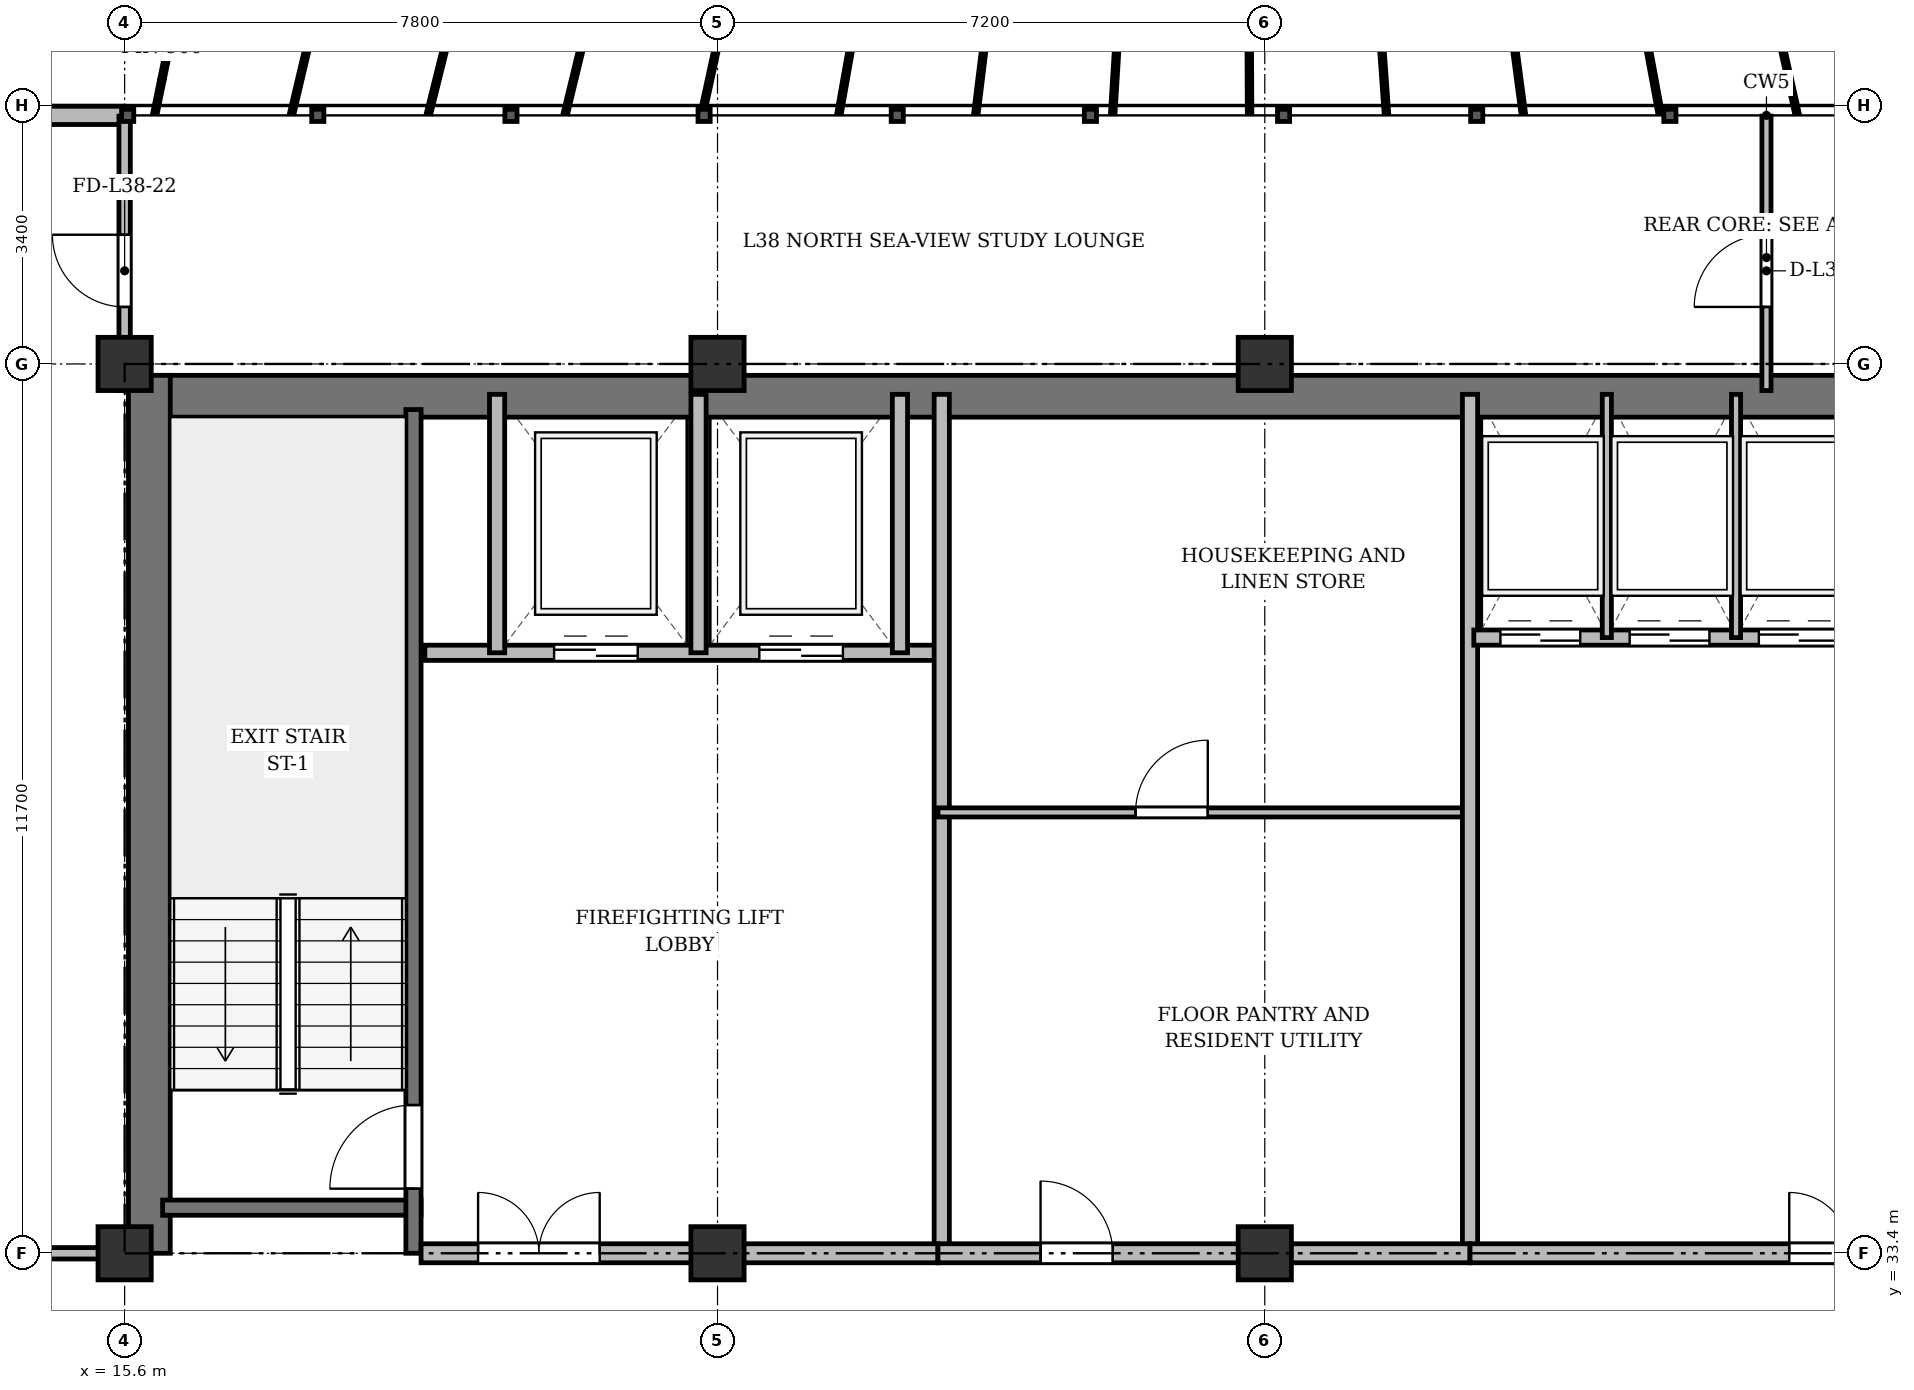
"""IFC4 building model, lengths in metres.
Left out: names, types, materials, properties, quantities, classifications, styles, units other than length and angle.
Written with IfcOpenShell. Run it as: python <this file> out.ifc"""

import sys

from ifc_helpers import new_model, si_unit, direction, frame, frame_2d, origin, origin_2d, place, context, subcontext, project, spatial, rectangle, extrude, source, transform, mapped, element, fill, save


model = new_model("IFC4")
c1 = context("Model", 3, precision=1e-05, world=origin(), true_north=direction((0.0, 1.0)))
c2 = subcontext(c1, "Body", "Model", "MODEL_VIEW")
j1 = project(units=[si_unit("LENGTHUNIT", "METRE"), si_unit("PLANEANGLEUNIT", "RADIAN")], contexts=[c1])
p1 = place(None, origin())
s1 = spatial("IfcSite", under=j1, at=p1, CompositionType="ELEMENT")
p2 = place(p1, origin())
s2 = spatial("IfcBuilding", under=s1, at=p2, CompositionType="ELEMENT")
p3 = place(p2, frame((0.0, 0.0, 146.5)))
s3 = spatial("IfcBuildingStorey", under=s2, at=p3, CompositionType="ELEMENT", Elevation=146.5)
m1 = source(origin(), c2, "Body", "SweptSolid", [
    extrude(rectangle(XDim=0.7, YDim=0.7, at=origin_2d()), origin(), (0.0, 0.0, 1.0), 3.6),
])
for number, where, z_axis, x_axis in (
    (1, (15.6, 33.4, 0.0), (0.0, 0.0, 1.0), (1.0, 0.0, 0.0)),
    (2, (15.6, 45.1, 0.0), (0.0, 0.0, 1.0), (1.0, 0.0, 0.0)),
    (3, (23.4, 33.4, 0.0), (0.0, 0.0, 1.0), (1.0, 0.0, 0.0)),
    (4, (23.4, 45.1, 0.0), (0.0, 0.0, 1.0), (1.0, 0.0, 0.0)),
    (5, (30.6, 33.4, 0.0), (0.0, 0.0, 1.0), (1.0, 0.0, 0.0)),
    (6, (30.6, 45.1, 0.0), (0.0, 0.0, 1.0), (1.0, 0.0, 0.0)),
):
    element("IfcColumn", number, at=place(p3, frame(where, z_axis=z_axis, x_axis=x_axis)), inside=s3, PredefinedType="COLUMN", context=c2, shape_type="MappedRepresentation", body=[
        mapped(m1, transform((0.0, 0.0, 0.0), x_axis=(1.0, 0.0, 0.0), y_axis=(0.0, 1.0, 0.0), z_axis=(0.0, 0.0, 1.0), scale=1.0)),
    ])
p4 = place(p3, frame((10.9, 48.37, 0.0), z_axis=(0.0, 0.0, 1.0), x_axis=(1.0, 0.0, 0.0)))
e7 = element("IfcWall", 7, at=p4, inside=s3, PredefinedType="SOLIDWALL", context=c2, shape_type="SweptSolid", body=[
    extrude(rectangle(XDim=4.7, YDim=0.24, at=frame_2d((2.35, 0.0))), origin(), (0.0, 0.0, 1.0), 3.35),
])
p5 = place(p4, frame((1.659, 0.0, 0.9)))
e8 = element("IfcOpeningElement", 8, at=p5, cuts=e7, PredefinedType="OPENING", context=c2, shape_type="SweptSolid", body=[
    extrude(rectangle(XDim=1.2, YDim=1.65, at=frame_2d((0.6, 0.825))), frame((0.0, 0.13, 0.0), z_axis=(0.0, -1.0, 0.0), x_axis=(1.0, 0.0, 0.0)), (0.0, 0.0, 1.0), 0.26),
])
p6 = place(p3, frame((15.65, 44.675, 0.0), z_axis=(0.0, 0.0, 1.0), x_axis=(1.0, 0.0, 0.0)))
e9 = element("IfcWall", 9, at=p6, inside=s3, PredefinedType="SHEAR", context=c2, shape_type="SweptSolid", body=[
    extrude(rectangle(XDim=43.1, YDim=0.55, at=frame_2d((21.55, 0.0))), origin(), (0.0, 0.0, 1.0), 3.35),
])
p7 = place(p3, frame((15.925, 33.4, 0.0), z_axis=(0.0, 0.0, 1.0), x_axis=(0.0, 1.0, 0.0)))
e10 = element("IfcWall", 10, at=p7, inside=s3, PredefinedType="SHEAR", context=c2, shape_type="SweptSolid", body=[
    extrude(rectangle(XDim=11.55, YDim=0.55, at=frame_2d((5.775, 0.0))), origin(), (0.0, 0.0, 1.0), 3.35),
])
p8 = place(p3, frame((16.1, 34.0, 0.0), z_axis=(0.0, 0.0, 1.0), x_axis=(1.0, 0.0, 0.0)))
e11 = element("IfcWall", 11, at=p8, inside=s3, PredefinedType="SHEAR", context=c2, shape_type="SweptSolid", body=[
    extrude(rectangle(XDim=3.4, YDim=0.2, at=frame_2d((1.7, 0.0))), origin(), (0.0, 0.0, 1.0), 3.35),
])
p9 = place(p3, frame((19.4, 33.4, 0.0), z_axis=(0.0, 0.0, 1.0), x_axis=(0.0, 1.0, 0.0)))
e12 = element("IfcWall", 12, at=p9, inside=s3, PredefinedType="SHEAR", context=c2, shape_type="SweptSolid", body=[
    extrude(rectangle(XDim=11.1, YDim=0.2, at=frame_2d((5.55, 0.0))), origin(), (0.0, 0.0, 1.0), 3.35),
])
p10 = place(p9, frame((0.85, 0.0, 0.0)))
e13 = element("IfcOpeningElement", 13, at=p10, cuts=e12, PredefinedType="OPENING", context=c2, shape_type="SweptSolid", body=[
    extrude(rectangle(XDim=1.1, YDim=2.15, at=frame_2d((0.55, 1.075))), frame((0.0, 0.11, 0.0), z_axis=(0.0, -1.0, 0.0), x_axis=(1.0, 0.0, 0.0)), (0.0, 0.0, 1.0), 0.22),
])
p11 = place(p3, frame((19.55, 41.3, 0.0), z_axis=(0.0, 0.0, 1.0), x_axis=(1.0, 0.0, 0.0)))
e14 = element("IfcWall", 14, at=p11, inside=s3, PredefinedType="SOLIDWALL", context=c2, shape_type="SweptSolid", body=[
    extrude(rectangle(XDim=6.75, YDim=0.2, at=frame_2d((3.375, 0.0))), origin(), (0.0, 0.0, 1.0), 3.35),
])
p12 = place(p11, frame((1.7, 0.0, 0.0)))
e15 = element("IfcOpeningElement", 15, at=p12, cuts=e14, PredefinedType="OPENING", context=c2, shape_type="SweptSolid", body=[
    extrude(rectangle(XDim=1.1, YDim=2.15, at=frame_2d((0.55, 1.075))), frame((0.0, 0.11, 0.0), z_axis=(0.0, -1.0, 0.0), x_axis=(1.0, 0.0, 0.0)), (0.0, 0.0, 1.0), 0.22),
])
p13 = place(p11, frame((4.4, 0.0, 0.0)))
e16 = element("IfcOpeningElement", 16, at=p13, cuts=e14, PredefinedType="OPENING", context=c2, shape_type="SweptSolid", body=[
    extrude(rectangle(XDim=1.1, YDim=2.15, at=frame_2d((0.55, 1.075))), frame((0.0, 0.11, 0.0), z_axis=(0.0, -1.0, 0.0), x_axis=(1.0, 0.0, 0.0)), (0.0, 0.0, 1.0), 0.22),
])
for number, where, z_axis, x_axis in (
    (17, (20.5, 41.3, 0.0), (0.0, 0.0, 1.0), (0.0, 1.0, 0.0)),
    (18, (23.15, 41.3, 0.0), (0.0, 0.0, 1.0), (0.0, 1.0, 0.0)),
    (19, (25.8, 41.3, 0.0), (0.0, 0.0, 1.0), (0.0, 1.0, 0.0)),
):
    element("IfcWall", number, at=place(p3, frame(where, z_axis=z_axis, x_axis=x_axis)), inside=s3, PredefinedType="SOLIDWALL", context=c2, shape_type="SweptSolid", body=[
        extrude(rectangle(XDim=3.4, YDim=0.2, at=frame_2d((1.7, 0.0))), origin(), (0.0, 0.0, 1.0), 3.35),
    ])
p14 = place(p3, frame((26.35, 33.4, 0.0), z_axis=(0.0, 0.0, 1.0), x_axis=(0.0, 1.0, 0.0)))
e20 = element("IfcWall", 20, at=p14, inside=s3, PredefinedType="SOLIDWALL", context=c2, shape_type="SweptSolid", body=[
    extrude(rectangle(XDim=11.3, YDim=0.2, at=frame_2d((5.65, 0.0))), origin(), (0.0, 0.0, 1.0), 2.75),
])
p15 = place(p3, frame((19.5, 33.4, 0.0), z_axis=(0.0, 0.0, 1.0), x_axis=(1.0, 0.0, 0.0)))
e21 = element("IfcWall", 21, at=p15, inside=s3, PredefinedType="PARTITIONING", context=c2, shape_type="SweptSolid", body=[
    extrude(rectangle(XDim=6.8, YDim=0.25, at=frame_2d((3.4, 0.0))), origin(), (0.0, 0.0, 1.0), 2.75),
])
p16 = place(p15, frame((0.75, 0.0, 0.0)))
e22 = element("IfcOpeningElement", 22, at=p16, cuts=e21, PredefinedType="OPENING", context=c2, shape_type="SweptSolid", body=[
    extrude(rectangle(XDim=1.6, YDim=2.2, at=frame_2d((0.8, 1.1))), frame((0.0, 0.135, 0.0), z_axis=(0.0, -1.0, 0.0), x_axis=(1.0, 0.0, 0.0)), (0.0, 0.0, 1.0), 0.27),
])
p17 = place(p3, frame((26.3, 39.2, 0.0), z_axis=(0.0, 0.0, 1.0), x_axis=(1.0, 0.0, 0.0)))
e23 = element("IfcWall", 23, at=p17, inside=s3, PredefinedType="PARTITIONING", context=c2, shape_type="SweptSolid", body=[
    extrude(rectangle(XDim=7.0, YDim=0.12, at=frame_2d((3.5, 0.0))), origin(), (0.0, 0.0, 1.0), 2.85),
])
p18 = place(p17, frame((2.6, 0.0, 0.0)))
e24 = element("IfcOpeningElement", 24, at=p18, cuts=e23, PredefinedType="OPENING", context=c2, shape_type="SweptSolid", body=[
    extrude(rectangle(XDim=0.95, YDim=2.15, at=frame_2d((0.475, 1.075))), frame((0.0, 0.07, 0.0), z_axis=(0.0, -1.0, 0.0), x_axis=(1.0, 0.0, 0.0)), (0.0, 0.0, 1.0), 0.14),
])
p19 = place(p3, frame((33.3, 33.4, 0.0), z_axis=(0.0, 0.0, 1.0), x_axis=(0.0, 1.0, 0.0)))
e25 = element("IfcWall", 25, at=p19, inside=s3, PredefinedType="SOLIDWALL", context=c2, shape_type="SweptSolid", body=[
    extrude(rectangle(XDim=11.3, YDim=0.2, at=frame_2d((5.65, 0.0))), origin(), (0.0, 0.0, 1.0), 2.75),
])
p20 = place(p3, frame((33.35, 41.5, 0.0), z_axis=(0.0, 0.0, 1.0), x_axis=(1.0, 0.0, 0.0)))
e26 = element("IfcWall", 26, at=p20, inside=s3, PredefinedType="SOLIDWALL", context=c2, shape_type="SweptSolid", body=[
    extrude(rectangle(XDim=6.9, YDim=0.2, at=frame_2d((3.45, 0.0))), origin(), (0.0, 0.0, 1.0), 3.35),
])
p21 = place(p20, frame((0.35, 0.0, 0.0)))
e27 = element("IfcOpeningElement", 27, at=p21, cuts=e26, PredefinedType="OPENING", context=c2, shape_type="SweptSolid", body=[
    extrude(rectangle(XDim=1.05, YDim=2.15, at=frame_2d((0.525, 1.075))), frame((0.0, 0.11, 0.0), z_axis=(0.0, -1.0, 0.0), x_axis=(1.0, 0.0, 0.0)), (0.0, 0.0, 1.0), 0.22),
])
p22 = place(p20, frame((2.05, 0.0, 0.0)))
e28 = element("IfcOpeningElement", 28, at=p22, cuts=e26, PredefinedType="OPENING", context=c2, shape_type="SweptSolid", body=[
    extrude(rectangle(XDim=1.05, YDim=2.15, at=frame_2d((0.525, 1.075))), frame((0.0, 0.11, 0.0), z_axis=(0.0, -1.0, 0.0), x_axis=(1.0, 0.0, 0.0)), (0.0, 0.0, 1.0), 0.22),
])
p23 = place(p20, frame((3.75, 0.0, 0.0)))
e29 = element("IfcOpeningElement", 29, at=p23, cuts=e26, PredefinedType="OPENING", context=c2, shape_type="SweptSolid", body=[
    extrude(rectangle(XDim=1.05, YDim=2.15, at=frame_2d((0.525, 1.075))), frame((0.0, 0.11, 0.0), z_axis=(0.0, -1.0, 0.0), x_axis=(1.0, 0.0, 0.0)), (0.0, 0.0, 1.0), 0.22),
])
p24 = place(p20, frame((5.45, 0.0, 0.0)))
e30 = element("IfcOpeningElement", 30, at=p24, cuts=e26, PredefinedType="OPENING", context=c2, shape_type="SweptSolid", body=[
    extrude(rectangle(XDim=1.05, YDim=2.15, at=frame_2d((0.525, 1.075))), frame((0.0, 0.11, 0.0), z_axis=(0.0, -1.0, 0.0), x_axis=(1.0, 0.0, 0.0)), (0.0, 0.0, 1.0), 0.22),
])
for number, where, z_axis, x_axis in (
    (31, (35.1, 41.5, 0.0), (0.0, 0.0, 1.0), (0.0, 1.0, 0.0)),
    (32, (36.8, 41.5, 0.0), (0.0, 0.0, 1.0), (0.0, 1.0, 0.0)),
):
    element("IfcWall", number, at=place(p3, frame(where, z_axis=z_axis, x_axis=x_axis)), inside=s3, PredefinedType="PARTITIONING", context=c2, shape_type="SweptSolid", body=[
        extrude(rectangle(XDim=3.2, YDim=0.12, at=frame_2d((1.6, 0.0))), origin(), (0.0, 0.0, 1.0), 3.35),
    ])
p25 = place(p3, frame((26.3, 33.4, 0.0), z_axis=(0.0, 0.0, 1.0), x_axis=(1.0, 0.0, 0.0)))
e33 = element("IfcWall", 33, at=p25, inside=s3, PredefinedType="PARTITIONING", context=c2, shape_type="SweptSolid", body=[
    extrude(rectangle(XDim=7.0, YDim=0.25, at=frame_2d((3.5, 0.0))), origin(), (0.0, 0.0, 1.0), 2.75),
])
p26 = place(p25, frame((1.35, 0.0, 0.0)))
e34 = element("IfcOpeningElement", 34, at=p26, cuts=e33, PredefinedType="OPENING", context=c2, shape_type="SweptSolid", body=[
    extrude(rectangle(XDim=0.95, YDim=2.15, at=frame_2d((0.475, 1.075))), frame((0.0, 0.135, 0.0), z_axis=(0.0, -1.0, 0.0), x_axis=(1.0, 0.0, 0.0)), (0.0, 0.0, 1.0), 0.27),
])
p27 = place(p3, frame((33.3, 33.4, 0.0), z_axis=(0.0, 0.0, 1.0), x_axis=(1.0, 0.0, 0.0)))
e35 = element("IfcWall", 35, at=p27, inside=s3, PredefinedType="PARTITIONING", context=c2, shape_type="SweptSolid", body=[
    extrude(rectangle(XDim=13.85, YDim=0.25, at=frame_2d((6.925, 0.0))), origin(), (0.0, 0.0, 1.0), 2.75),
])
p28 = place(p27, frame((4.2, 0.0, 0.0)))
e36 = element("IfcOpeningElement", 36, at=p28, cuts=e35, PredefinedType="OPENING", context=c2, shape_type="SweptSolid", body=[
    extrude(rectangle(XDim=1.6, YDim=2.2, at=frame_2d((0.8, 1.1))), frame((0.0, 0.135, 0.0), z_axis=(0.0, -1.0, 0.0), x_axis=(1.0, 0.0, 0.0)), (0.0, 0.0, 1.0), 0.27),
])
p29 = place(p3, frame((8.05, 33.4, 0.0), z_axis=(0.0, 0.0, 1.0), x_axis=(1.0, 0.0, 0.0)))
e37 = element("IfcWall", 37, at=p29, inside=s3, PredefinedType="PARTITIONING", context=c2, shape_type="SweptSolid", body=[
    extrude(rectangle(XDim=7.55, YDim=0.15, at=frame_2d((3.775, 0.0))), origin(), (0.0, 0.0, 1.0), 2.75),
])
p30 = place(p29, frame((3.2, 0.0, 0.0)))
e38 = element("IfcOpeningElement", 38, at=p30, cuts=e37, PredefinedType="OPENING", context=c2, shape_type="SweptSolid", body=[
    extrude(rectangle(XDim=0.95, YDim=2.15, at=frame_2d((0.475, 1.075))), frame((0.0, 0.085, 0.0), z_axis=(0.0, -1.0, 0.0), x_axis=(1.0, 0.0, 0.0)), (0.0, 0.0, 1.0), 0.17),
])
p31 = place(p3, frame((37.2, 44.75, 0.0), z_axis=(0.0, 0.0, 1.0), x_axis=(0.0, 1.0, 0.0)))
e39 = element("IfcWall", 39, at=p31, inside=s3, PredefinedType="PARTITIONING", context=c2, shape_type="SweptSolid", body=[
    extrude(rectangle(XDim=3.61, YDim=0.12, at=frame_2d((1.805, 0.0))), origin(), (0.0, 0.0, 1.0), 2.75),
])
p32 = place(p31, frame((1.1, 0.0, 0.0)))
e40 = element("IfcOpeningElement", 40, at=p32, cuts=e39, PredefinedType="OPENING", context=c2, shape_type="SweptSolid", body=[
    extrude(rectangle(XDim=0.95, YDim=2.15, at=frame_2d((0.475, 1.075))), frame((0.0, 0.07, 0.0), z_axis=(0.0, -1.0, 0.0), x_axis=(1.0, 0.0, 0.0)), (0.0, 0.0, 1.0), 0.14),
])
p33 = place(p3, frame((15.6, 44.75, 0.0), z_axis=(0.0, 0.0, 1.0), x_axis=(0.0, 1.0, 0.0)))
e41 = element("IfcWall", 41, at=p33, inside=s3, PredefinedType="PARTITIONING", context=c2, shape_type="SweptSolid", body=[
    extrude(rectangle(XDim=3.61, YDim=0.15, at=frame_2d((1.805, 0.0))), origin(), (0.0, 0.0, 1.0), 2.85),
])
p34 = place(p33, frame((1.1, 0.0, 0.0)))
e42 = element("IfcOpeningElement", 42, at=p34, cuts=e41, PredefinedType="OPENING", context=c2, shape_type="SweptSolid", body=[
    extrude(rectangle(XDim=0.95, YDim=2.15, at=frame_2d((0.475, 1.075))), frame((0.0, 0.085, 0.0), z_axis=(0.0, -1.0, 0.0), x_axis=(1.0, 0.0, 0.0)), (0.0, 0.0, 1.0), 0.17),
])
m2 = source(origin(), c2, "Body", "SweptSolid", [
    extrude(rectangle(XDim=1.1, YDim=2.15, at=frame_2d((0.55, 1.075))), frame((0.0, 0.025, 0.0), z_axis=(0.0, -1.0, 0.0), x_axis=(1.0, 0.0, 0.0)), (0.0, 0.0, 1.0), 0.05),
])
p35 = place(p10, origin())
e43 = element("IfcDoor", 43, at=p35, inside=s3, OperationType="SINGLE_SWING_LEFT", PredefinedType="DOOR", context=c2, shape_type="MappedRepresentation", body=[
    mapped(m2, transform((0.0, 0.0, 0.0), x_axis=(1.0, 0.0, 0.0), y_axis=(0.0, 1.0, 0.0), z_axis=(0.0, 0.0, 1.0), scale=1.0)),
])
fill(e13, e43)
p36 = place(p12, origin())
e44 = element("IfcDoor", 44, at=p36, inside=s3, OperationType="DOUBLE_DOOR_SLIDING", PredefinedType="DOOR", context=c2, shape_type="MappedRepresentation", body=[
    mapped(m2, transform((0.0, 0.0, 0.0), x_axis=(1.0, 0.0, 0.0), y_axis=(0.0, 1.0, 0.0), z_axis=(0.0, 0.0, 1.0), scale=1.0)),
])
fill(e15, e44)
p37 = place(p13, origin())
e45 = element("IfcDoor", 45, at=p37, inside=s3, OperationType="DOUBLE_DOOR_SLIDING", PredefinedType="DOOR", context=c2, shape_type="MappedRepresentation", body=[
    mapped(m2, transform((0.0, 0.0, 0.0), x_axis=(1.0, 0.0, 0.0), y_axis=(0.0, 1.0, 0.0), z_axis=(0.0, 0.0, 1.0), scale=1.0)),
])
fill(e16, e45)
m3 = source(origin(), c2, "Body", "SweptSolid", [
    extrude(rectangle(XDim=1.6, YDim=2.2, at=frame_2d((0.8, 1.1))), frame((0.0, 0.025, 0.0), z_axis=(0.0, -1.0, 0.0), x_axis=(1.0, 0.0, 0.0)), (0.0, 0.0, 1.0), 0.05),
])
p38 = place(p16, origin())
e46 = element("IfcDoor", 46, at=p38, inside=s3, OperationType="DOUBLE_DOOR_SINGLE_SWING", PredefinedType="DOOR", context=c2, shape_type="MappedRepresentation", body=[
    mapped(m3, transform((0.0, 0.0, 0.0), x_axis=(1.0, 0.0, 0.0), y_axis=(0.0, 1.0, 0.0), z_axis=(0.0, 0.0, 1.0), scale=1.0)),
])
fill(e22, e46)
m4 = source(origin(), c2, "Body", "SweptSolid", [
    extrude(rectangle(XDim=0.95, YDim=2.15, at=frame_2d((0.475, 1.075))), frame((0.0, 0.025, 0.0), z_axis=(0.0, -1.0, 0.0), x_axis=(1.0, 0.0, 0.0)), (0.0, 0.0, 1.0), 0.05),
])
p39 = place(p18, origin())
e47 = element("IfcDoor", 47, at=p39, inside=s3, OperationType="SINGLE_SWING_RIGHT", PredefinedType="DOOR", context=c2, shape_type="MappedRepresentation", body=[
    mapped(m4, transform((0.0, 0.0, 0.0), x_axis=(1.0, 0.0, 0.0), y_axis=(0.0, 1.0, 0.0), z_axis=(0.0, 0.0, 1.0), scale=1.0)),
])
fill(e24, e47)
m5 = source(origin(), c2, "Body", "SweptSolid", [
    extrude(rectangle(XDim=1.05, YDim=2.15, at=frame_2d((0.525, 1.075))), frame((0.0, 0.025, 0.0), z_axis=(0.0, -1.0, 0.0), x_axis=(1.0, 0.0, 0.0)), (0.0, 0.0, 1.0), 0.05),
])
p40 = place(p21, origin())
e48 = element("IfcDoor", 48, at=p40, inside=s3, OperationType="DOUBLE_DOOR_SLIDING", PredefinedType="DOOR", context=c2, shape_type="MappedRepresentation", body=[
    mapped(m5, transform((0.0, 0.0, 0.0), x_axis=(1.0, 0.0, 0.0), y_axis=(0.0, 1.0, 0.0), z_axis=(0.0, 0.0, 1.0), scale=1.0)),
])
fill(e27, e48)
p41 = place(p22, origin())
e49 = element("IfcDoor", 49, at=p41, inside=s3, OperationType="DOUBLE_DOOR_SLIDING", PredefinedType="DOOR", context=c2, shape_type="MappedRepresentation", body=[
    mapped(m5, transform((0.0, 0.0, 0.0), x_axis=(1.0, 0.0, 0.0), y_axis=(0.0, 1.0, 0.0), z_axis=(0.0, 0.0, 1.0), scale=1.0)),
])
fill(e28, e49)
p42 = place(p23, origin())
e50 = element("IfcDoor", 50, at=p42, inside=s3, OperationType="DOUBLE_DOOR_SLIDING", PredefinedType="DOOR", context=c2, shape_type="MappedRepresentation", body=[
    mapped(m5, transform((0.0, 0.0, 0.0), x_axis=(1.0, 0.0, 0.0), y_axis=(0.0, 1.0, 0.0), z_axis=(0.0, 0.0, 1.0), scale=1.0)),
])
fill(e29, e50)
p43 = place(p26, origin())
e51 = element("IfcDoor", 51, at=p43, inside=s3, OperationType="SINGLE_SWING_LEFT", PredefinedType="DOOR", context=c2, shape_type="MappedRepresentation", body=[
    mapped(m4, transform((0.0, 0.0, 0.0), x_axis=(1.0, 0.0, 0.0), y_axis=(0.0, 1.0, 0.0), z_axis=(0.0, 0.0, 1.0), scale=1.0)),
])
fill(e34, e51)
p44 = place(p28, origin())
e52 = element("IfcDoor", 52, at=p44, inside=s3, OperationType="DOUBLE_DOOR_SINGLE_SWING", PredefinedType="DOOR", context=c2, shape_type="MappedRepresentation", body=[
    mapped(m3, transform((0.0, 0.0, 0.0), x_axis=(1.0, 0.0, 0.0), y_axis=(0.0, 1.0, 0.0), z_axis=(0.0, 0.0, 1.0), scale=1.0)),
])
fill(e36, e52)
p45 = place(p32, origin())
e53 = element("IfcDoor", 53, at=p45, inside=s3, OperationType="SINGLE_SWING_LEFT", PredefinedType="DOOR", context=c2, shape_type="MappedRepresentation", body=[
    mapped(m4, transform((0.0, 0.0, 0.0), x_axis=(1.0, 0.0, 0.0), y_axis=(0.0, 1.0, 0.0), z_axis=(0.0, 0.0, 1.0), scale=1.0)),
])
fill(e40, e53)
p46 = place(p34, origin())
e54 = element("IfcDoor", 54, at=p46, inside=s3, OperationType="SINGLE_SWING_RIGHT", PredefinedType="DOOR", context=c2, shape_type="MappedRepresentation", body=[
    mapped(m4, transform((0.0, 0.0, 0.0), x_axis=(1.0, 0.0, 0.0), y_axis=(0.0, 1.0, 0.0), z_axis=(0.0, 0.0, 1.0), scale=1.0)),
])
fill(e42, e54)
save(model, sys.argv[1])
